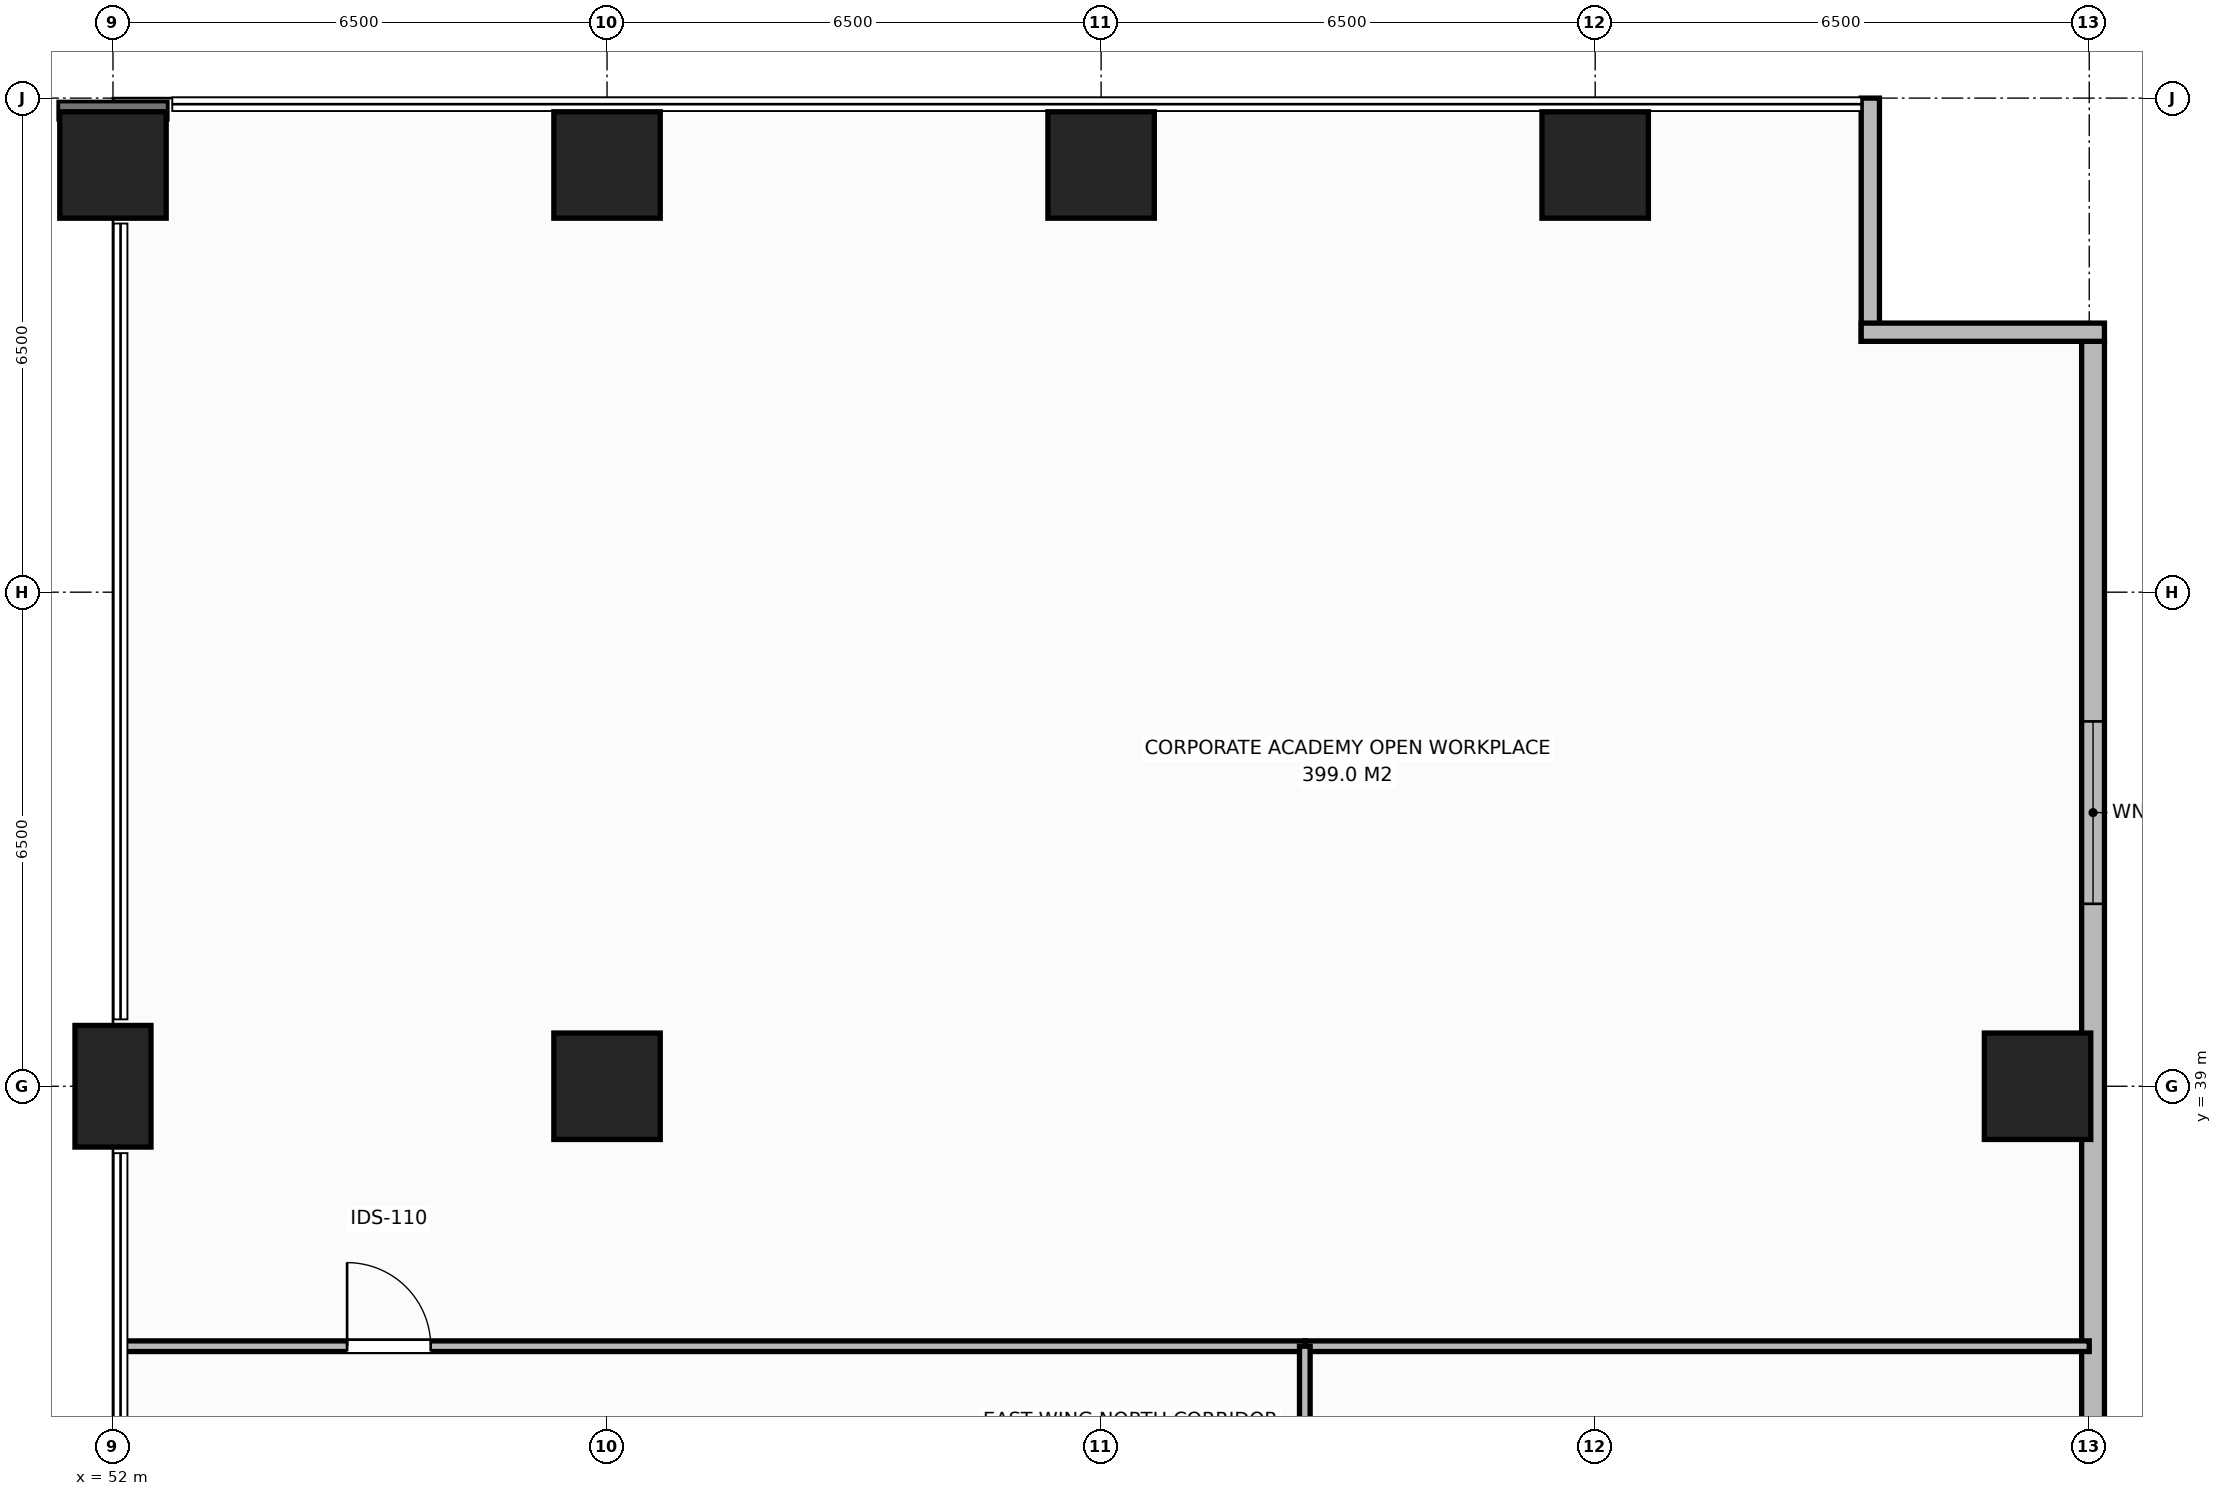
"""IFC4 building model, lengths in metres.
Left out: names, types, materials, properties, quantities, classifications, styles, units other than length and angle.
Written with IfcOpenShell. Run it as: python <this file> out.ifc"""

import sys

from ifc_helpers import new_model, si_unit, direction, frame, frame_2d, origin, origin_2d, place, context, subcontext, project, spatial, rectangle, extrude, element, fill, save


model = new_model("IFC4")
c1 = context("Model", 3, precision=1e-05, world=origin(), true_north=direction((0.0, 1.0)))
c2 = subcontext(c1, "Body", "Model", "MODEL_VIEW")
j1 = project(units=[si_unit("LENGTHUNIT", "METRE"), si_unit("PLANEANGLEUNIT", "RADIAN")], contexts=[c1])
p1 = place(None, origin())
s1 = spatial("IfcSite", under=j1, at=p1, CompositionType="ELEMENT")
p2 = place(p1, origin())
s2 = spatial("IfcBuilding", under=s1, at=p2, CompositionType="ELEMENT")
p3 = place(p2, frame((0.0, 0.0, 11.5)))
s3 = spatial("IfcBuildingStorey", under=s2, at=p3, CompositionType="ELEMENT", Elevation=11.5)
p4 = place(p3, frame((58.5, 39.0, 0.0), z_axis=(0.0, 0.0, 1.0), x_axis=(1.0, 0.0, 0.0)))
e1 = element("IfcColumn", 1, at=p4, inside=s3, PredefinedType="COLUMN", context=c2, shape_type="SweptSolid", body=[
    extrude(rectangle(XDim=1.4, YDim=1.4, at=origin_2d()), origin(), (0.0, 0.0, 1.0), 5.5),
])
p5 = place(p3, frame((52.0, 39.0, 0.0), z_axis=(0.0, 0.0, 1.0), x_axis=(1.0, 0.0, 0.0)))
e2 = element("IfcColumn", 2, at=p5, inside=s3, PredefinedType="PILASTER", context=c2, shape_type="SweptSolid", body=[
    extrude(rectangle(XDim=1.0, YDim=1.6, at=origin_2d()), origin(), (0.0, 0.0, 1.0), 5.5),
])
for number, where, z_axis, x_axis in (
    (3, (52.0, 51.12, 0.0), (0.0, 0.0, 1.0), (1.0, 0.0, 0.0)),
    (4, (58.5, 51.12, 0.0), (0.0, 0.0, 1.0), (1.0, 0.0, 0.0)),
    (5, (65.0, 51.12, 0.0), (0.0, 0.0, 1.0), (1.0, 0.0, 0.0)),
    (6, (71.5, 51.12, 0.0), (0.0, 0.0, 1.0), (1.0, 0.0, 0.0)),
    (7, (77.32, 39.0, 0.0), (0.0, 0.0, 1.0), (1.0, 0.0, 0.0)),
):
    element("IfcColumn", number, at=place(p3, frame(where, z_axis=z_axis, x_axis=x_axis)), inside=s3, PredefinedType="COLUMN", context=c2, shape_type="SweptSolid", body=[
        extrude(rectangle(XDim=1.4, YDim=1.4, at=origin_2d()), origin(), (0.0, 0.0, 1.0), 5.5),
    ])
p6 = place(p3, frame((78.05, 48.8, 0.0), z_axis=(0.0, 0.0, 1.0), x_axis=(0.0, -1.0, 0.0)))
e8 = element("IfcWall", 8, at=p6, inside=s3, PredefinedType="STANDARD", context=c2, shape_type="SweptSolid", body=[
    extrude(rectangle(XDim=45.6, YDim=0.3, at=frame_2d((22.8, 0.0))), origin(), (0.0, 0.0, 1.0), 5.22),
])
p7 = place(p6, frame((5.0, 0.0, 0.9)))
e9 = element("IfcOpeningElement", 9, at=p7, cuts=e8, PredefinedType="OPENING", context=c2, shape_type="SweptSolid", body=[
    extrude(rectangle(XDim=2.4, YDim=2.2, at=frame_2d((1.2, 1.1))), frame((0.0, 0.16, 0.0), z_axis=(0.0, -1.0, 0.0), x_axis=(1.0, 0.0, 0.0)), (0.0, 0.0, 1.0), 0.32),
])
p8 = place(p6, frame((14.5, 0.0, 0.9)))
e10 = element("IfcOpeningElement", 10, at=p8, cuts=e8, PredefinedType="OPENING", context=c2, shape_type="SweptSolid", body=[
    extrude(rectangle(XDim=2.4, YDim=2.2, at=frame_2d((1.2, 1.1))), frame((0.0, 0.16, 0.0), z_axis=(0.0, -1.0, 0.0), x_axis=(1.0, 0.0, 0.0)), (0.0, 0.0, 1.0), 0.32),
])
p9 = place(p6, frame((25.5, 0.0, 0.9)))
e11 = element("IfcOpeningElement", 11, at=p9, cuts=e8, PredefinedType="OPENING", context=c2, shape_type="SweptSolid", body=[
    extrude(rectangle(XDim=2.4, YDim=2.2, at=frame_2d((1.2, 1.1))), frame((0.0, 0.16, 0.0), z_axis=(0.0, -1.0, 0.0), x_axis=(1.0, 0.0, 0.0)), (0.0, 0.0, 1.0), 0.32),
])
p10 = place(p6, frame((35.0, 0.0, 0.9)))
e12 = element("IfcOpeningElement", 12, at=p10, cuts=e8, PredefinedType="OPENING", context=c2, shape_type="SweptSolid", body=[
    extrude(rectangle(XDim=2.4, YDim=2.2, at=frame_2d((1.2, 1.1))), frame((0.0, 0.16, 0.0), z_axis=(0.0, -1.0, 0.0), x_axis=(1.0, 0.0, 0.0)), (0.0, 0.0, 1.0), 0.32),
])
for number, where, z_axis, x_axis in (
    (13, (75.12, 52.0, 0.0), (0.0, 0.0, 1.0), (0.0, -1.0, 0.0)),
    (14, (75.0, 48.92, 0.0), (0.0, 0.0, 1.0), (1.0, 0.0, 0.0)),
):
    element("IfcWall", number, at=place(p3, frame(where, z_axis=z_axis, x_axis=x_axis)), inside=s3, PredefinedType="STANDARD", context=c2, shape_type="SweptSolid", body=[
        extrude(rectangle(XDim=3.2, YDim=0.24, at=frame_2d((1.6, 0.0))), origin(), (0.0, 0.0, 1.0), 5.22),
    ])
p11 = place(p3, frame((67.68, 35.58, 0.0), z_axis=(0.0, 0.0, 1.0), x_axis=(1.0, 0.0, 0.0)))
e15 = element("IfcWall", 15, at=p11, inside=s3, PredefinedType="PARTITIONING", context=c2, shape_type="SweptSolid", body=[
    extrude(rectangle(XDim=10.32, YDim=0.14, at=frame_2d((5.16, 0.0))), origin(), (0.0, 0.0, 1.0), 5.22),
])
p12 = place(p3, frame((52.08, 35.58, 0.0), z_axis=(0.0, 0.0, 1.0), x_axis=(1.0, 0.0, 0.0)))
e16 = element("IfcWall", 16, at=p12, inside=s3, PredefinedType="PARTITIONING", context=c2, shape_type="SweptSolid", body=[
    extrude(rectangle(XDim=15.6, YDim=0.14, at=frame_2d((7.8, 0.0))), origin(), (0.0, 0.0, 1.0), 5.22),
])
p13 = place(p12, frame((3.0, 0.0, 0.0)))
e17 = element("IfcOpeningElement", 17, at=p13, cuts=e16, PredefinedType="OPENING", context=c2, shape_type="SweptSolid", body=[
    extrude(rectangle(XDim=1.1, YDim=2.15, at=frame_2d((0.55, 1.075))), frame((0.0, 0.08, 0.0), z_axis=(0.0, -1.0, 0.0), x_axis=(1.0, 0.0, 0.0)), (0.0, 0.0, 1.0), 0.16),
])
p14 = place(p3, frame((67.68, 12.45, 0.0), z_axis=(0.0, 0.0, 1.0), x_axis=(0.0, 1.0, 0.0)))
e18 = element("IfcWall", 18, at=p14, inside=s3, PredefinedType="PARTITIONING", context=c2, shape_type="SweptSolid", body=[
    extrude(rectangle(XDim=23.13, YDim=0.14, at=frame_2d((11.565, 0.0))), origin(), (0.0, 0.0, 1.0), 5.22),
])
p15 = place(p14, frame((5.0, 0.0, 0.0)))
e19 = element("IfcOpeningElement", 19, at=p15, cuts=e18, PredefinedType="OPENING", context=c2, shape_type="SweptSolid", body=[
    extrude(rectangle(XDim=1.1, YDim=2.15, at=frame_2d((0.55, 1.075))), frame((0.0, 0.08, 0.0), z_axis=(0.0, -1.0, 0.0), x_axis=(1.0, 0.0, 0.0)), (0.0, 0.0, 1.0), 0.16),
])
p16 = place(p7, origin())
e20 = element("IfcWindow", 20, at=p16, inside=s3, PartitioningType="SINGLE_PANEL", PredefinedType="WINDOW", context=c2, shape_type="SweptSolid", body=[
    extrude(rectangle(XDim=2.4, YDim=2.2, at=frame_2d((1.2, 1.1))), frame((0.0, 0.03, 0.0), z_axis=(0.0, -1.0, 0.0), x_axis=(1.0, 0.0, 0.0)), (0.0, 0.0, 1.0), 0.06),
])
fill(e9, e20)
p17 = place(p13, origin())
e21 = element("IfcDoor", 21, at=p17, inside=s3, OperationType="SINGLE_SWING_LEFT", PredefinedType="DOOR", context=c2, shape_type="SweptSolid", body=[
    extrude(rectangle(XDim=1.1, YDim=2.15, at=frame_2d((0.55, 1.075))), frame((0.0, 0.025, 0.0), z_axis=(0.0, -1.0, 0.0), x_axis=(1.0, 0.0, 0.0)), (0.0, 0.0, 1.0), 0.05),
])
fill(e17, e21)
save(model, sys.argv[1])
